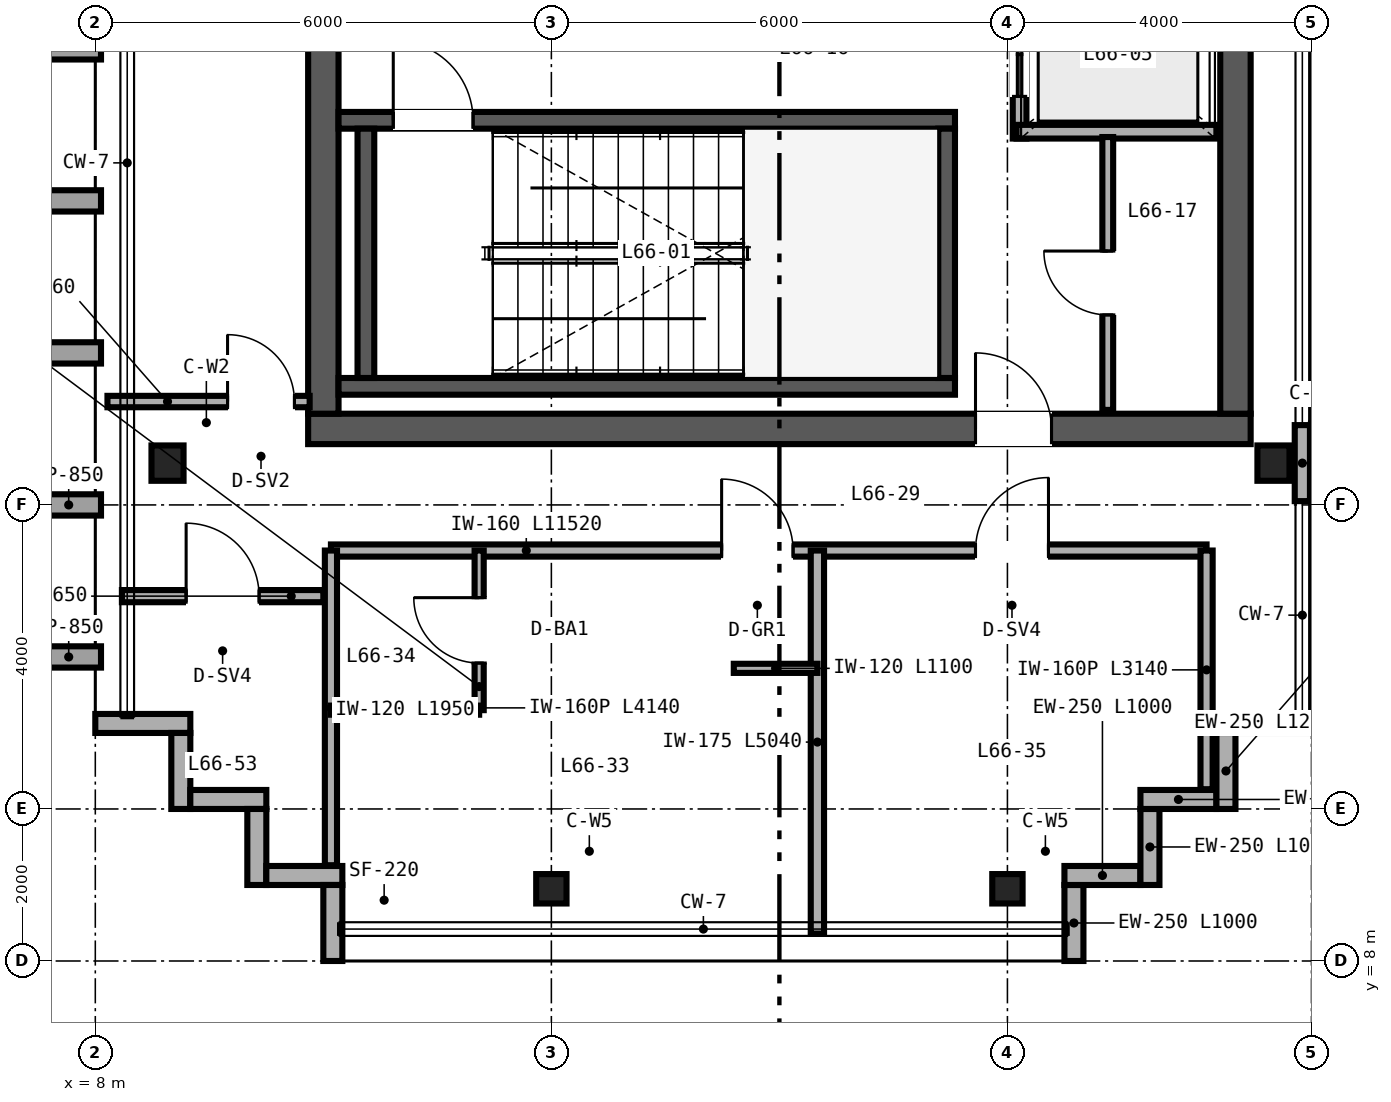
"""IFC4 building model, lengths in metres.
Left out: names, types, materials, properties, quantities, classifications, styles, units other than length and angle.
Written with IfcOpenShell. Run it as: python <this file> out.ifc"""

import sys

from ifc_helpers import new_model, si_unit, direction, frame, frame_2d, origin, origin_2d, place, context, subcontext, project, spatial, rectangle, i_section, extrude, source, transform, mapped, element, fill, save


model = new_model("IFC4")
c1 = context("Model", 3, precision=1e-05, world=origin(), true_north=direction((0.0, 1.0)))
c2 = subcontext(c1, "Body", "Model", "MODEL_VIEW")
j1 = project(units=[si_unit("LENGTHUNIT", "METRE"), si_unit("PLANEANGLEUNIT", "RADIAN")], contexts=[c1])
p1 = place(None, origin())
s1 = spatial("IfcSite", under=j1, at=p1, CompositionType="ELEMENT")
p2 = place(p1, origin())
s2 = spatial("IfcBuilding", under=s1, at=p2, CompositionType="ELEMENT")
p3 = place(p2, frame((0.0, 0.0, 261.6)))
s3 = spatial("IfcBuildingStorey", under=s2, at=p3, CompositionType="ELEMENT", Elevation=261.6)
p4 = place(p3, frame((10.8, 15.0, 0.0), z_axis=(0.0, 0.0, 1.0), x_axis=(1.0, 0.0, 0.0)))
e1 = element("IfcWall", 1, at=p4, inside=s3, PredefinedType="SHEAR", context=c2, shape_type="SweptSolid", body=[
    extrude(rectangle(XDim=12.4, YDim=0.4, at=frame_2d((6.2, 0.0))), origin(), (0.0, 0.0, 1.0), 3.38),
])
p5 = place(p4, frame((8.78, 0.0, 0.0)))
e2 = element("IfcOpeningElement", 2, at=p5, cuts=e1, PredefinedType="OPENING", context=c2, shape_type="SweptSolid", body=[
    extrude(rectangle(XDim=1.0, YDim=2.15, at=frame_2d((0.5, 1.075))), frame((0.0, 0.21, 0.0), z_axis=(0.0, -1.0, 0.0), x_axis=(1.0, 0.0, 0.0)), (0.0, 0.0, 1.0), 0.42),
])
for number, where, z_axis, x_axis in (
    (3, (11.0, 15.2, 0.0), (0.0, 0.0, 1.0), (0.0, 1.0, 0.0)),
    (4, (23.0, 15.2, 0.0), (0.0, 0.0, 1.0), (0.0, 1.0, 0.0)),
):
    element("IfcWall", number, at=place(p3, frame(where, z_axis=z_axis, x_axis=x_axis)), inside=s3, PredefinedType="SHEAR", context=c2, shape_type="SweptSolid", body=[
        extrude(rectangle(XDim=21.6, YDim=0.4, at=frame_2d((10.8, 0.0))), origin(), (0.0, 0.0, 1.0), 3.38),
    ])
p6 = place(p3, frame((11.2, 15.56, 0.0), z_axis=(0.0, 0.0, 1.0), x_axis=(1.0, 0.0, 0.0)))
e5 = element("IfcWall", 5, at=p6, inside=s3, PredefinedType="SHEAR", context=c2, shape_type="SweptSolid", body=[
    extrude(rectangle(XDim=8.11, YDim=0.22, at=frame_2d((4.055, 0.0))), origin(), (0.0, 0.0, 1.0), 3.4),
])
p7 = place(p3, frame((11.2, 19.06, 0.0), z_axis=(0.0, 0.0, 1.0), x_axis=(1.0, 0.0, 0.0)))
e6 = element("IfcWall", 6, at=p7, inside=s3, PredefinedType="SHEAR", context=c2, shape_type="SweptSolid", body=[
    extrude(rectangle(XDim=8.11, YDim=0.22, at=frame_2d((4.055, 0.0))), origin(), (0.0, 0.0, 1.0), 3.4),
])
p8 = place(p7, frame((0.72, 0.0, 0.0)))
e7 = element("IfcOpeningElement", 7, at=p8, cuts=e6, PredefinedType="OPENING", context=c2, shape_type="SweptSolid", body=[
    extrude(rectangle(XDim=1.05, YDim=2.15, at=frame_2d((0.525, 1.075))), frame((0.0, 0.12, 0.0), z_axis=(0.0, -1.0, 0.0), x_axis=(1.0, 0.0, 0.0)), (0.0, 0.0, 1.0), 0.24),
])
for number, where, z_axis, x_axis in (
    (8, (11.56, 15.67, 0.0), (0.0, 0.0, 1.0), (0.0, 1.0, 0.0)),
    (9, (19.2, 15.67, 0.0), (0.0, 0.0, 1.0), (0.0, 1.0, 0.0)),
):
    element("IfcWall", number, at=place(p3, frame(where, z_axis=z_axis, x_axis=x_axis)), inside=s3, PredefinedType="SHEAR", context=c2, shape_type="SweptSolid", body=[
        extrude(rectangle(XDim=3.28, YDim=0.22, at=frame_2d((1.64, 0.0))), origin(), (0.0, 0.0, 1.0), 3.4),
    ])
m1 = source(origin(), c2, "Body", "SweptSolid", [
    extrude(i_section(OverallWidth=0.422, OverallDepth=0.465, WebThickness=0.045, FlangeThickness=0.073, FilletRadius=0.025, at=origin_2d()), origin(), (0.0, 0.0, 1.0), 3.38),
])
for number, where, z_axis, x_axis in (
    (10, (8.95, 14.55, 0.0), (0.0, 0.0, 1.0), (1.0, 0.0, 0.0)),
    (11, (23.5, 14.55, 0.0), (0.0, 0.0, 1.0), (1.0, 0.0, 0.0)),
):
    element("IfcColumn", number, at=place(p3, frame(where, z_axis=z_axis, x_axis=x_axis)), inside=s3, PredefinedType="COLUMN", context=c2, shape_type="MappedRepresentation", body=[
        mapped(m1, transform((0.0, 0.0, 0.0), scale=1.0)),
    ])
m2 = source(origin(), c2, "Body", "SweptSolid", [
    extrude(i_section(OverallWidth=0.399, OverallDepth=0.387, WebThickness=0.021, FlangeThickness=0.033, FilletRadius=0.025, at=origin_2d()), origin(), (0.0, 0.0, 1.0), 3.38),
])
for number, where, z_axis, x_axis in (
    (12, (14.0, 8.95, 0.0), (0.0, 0.0, 1.0), (1.0, 0.0, 0.0)),
    (13, (20.0, 8.95, 0.0), (0.0, 0.0, 1.0), (1.0, 0.0, 0.0)),
):
    element("IfcColumn", number, at=place(p3, frame(where, z_axis=z_axis, x_axis=x_axis)), inside=s3, PredefinedType="COLUMN", context=c2, shape_type="MappedRepresentation", body=[
        mapped(m2, transform((0.0, 0.0, 0.0), scale=1.0)),
    ])
for number, where, z_axis, x_axis in (
    (14, (20.875, 8.0, 0.0), (0.0, 0.0, 1.0), (0.0, 1.0, 0.0)),
    (15, (20.75, 9.125, 0.0), (0.0, 0.0, 1.0), (1.0, 0.0, 0.0)),
    (16, (21.875, 9.0, 0.0), (0.0, 0.0, 1.0), (0.0, 1.0, 0.0)),
    (17, (21.75, 10.125, 0.0), (0.0, 0.0, 1.0), (1.0, 0.0, 0.0)),
    (18, (22.875, 10.0, 0.0), (0.0, 0.0, 1.0), (0.0, 1.0, 0.0)),
):
    element("IfcWall", number, at=place(p3, frame(where, z_axis=z_axis, x_axis=x_axis)), inside=s3, PredefinedType="SOLIDWALL", context=c2, shape_type="SweptSolid", body=[
        extrude(rectangle(XDim=1.0, YDim=0.25, at=frame_2d((0.5, 0.0))), origin(), (0.0, 0.0, 1.0), 3.38),
    ])
for number, where, z_axis, x_axis in (
    (19, (22.75, 11.125, 0.0), (0.0, 0.0, 1.0), (1.0, 0.0, 0.0)),
    (20, (8.0, 11.125, 0.0), (0.0, 0.0, 1.0), (1.0, 0.0, 0.0)),
):
    element("IfcWall", number, at=place(p3, frame(where, z_axis=z_axis, x_axis=x_axis)), inside=s3, PredefinedType="SOLIDWALL", context=c2, shape_type="SweptSolid", body=[
        extrude(rectangle(XDim=1.25, YDim=0.25, at=frame_2d((0.625, 0.0))), origin(), (0.0, 0.0, 1.0), 3.38),
    ])
for number, where, z_axis, x_axis in (
    (21, (9.125, 11.0, 0.0), (0.0, 0.0, 1.0), (0.0, -1.0, 0.0)),
    (22, (9.25, 10.125, 0.0), (0.0, 0.0, 1.0), (1.0, 0.0, 0.0)),
    (23, (10.125, 10.0, 0.0), (0.0, 0.0, 1.0), (0.0, -1.0, 0.0)),
    (24, (10.25, 9.125, 0.0), (0.0, 0.0, 1.0), (1.0, 0.0, 0.0)),
    (25, (11.125, 9.0, 0.0), (0.0, 0.0, 1.0), (0.0, -1.0, 0.0)),
):
    element("IfcWall", number, at=place(p3, frame(where, z_axis=z_axis, x_axis=x_axis)), inside=s3, PredefinedType="SOLIDWALL", context=c2, shape_type="SweptSolid", body=[
        extrude(rectangle(XDim=1.0, YDim=0.25, at=frame_2d((0.5, 0.0))), origin(), (0.0, 0.0, 1.0), 3.38),
    ])
p9 = place(p3, frame((23.88, 14.05, 0.0), z_axis=(0.0, 0.0, 1.0), x_axis=(0.0, 1.0, 0.0)))
e26 = element("IfcWall", 26, at=p9, inside=s3, PredefinedType="PARAPET", context=c2, shape_type="SweptSolid", body=[
    extrude(rectangle(XDim=1.0, YDim=0.2, at=frame_2d((0.5, 0.0))), origin(), (0.0, 0.0, 1.0), 3.38),
])
p10 = place(p3, frame((20.16, 18.82, 0.0), z_axis=(0.0, 0.0, 1.0), x_axis=(0.0, 1.0, 0.0)))
e27 = element("IfcWall", 27, at=p10, inside=s3, PredefinedType="SOLIDWALL", context=c2, shape_type="SweptSolid", body=[
    extrude(rectangle(XDim=6.32, YDim=0.18, at=frame_2d((3.16, 0.0))), origin(), (0.0, 0.0, 1.0), 2.48),
])
p11 = place(p10, frame((0.555, 0.0, 0.0)))
e28 = element("IfcOpeningElement", 28, at=p11, cuts=e27, PredefinedType="OPENING", context=c2, shape_type="SweptSolid", body=[
    extrude(rectangle(XDim=1.1, YDim=2.2, at=frame_2d((0.55, 1.1))), frame((0.0, 0.1, 0.0), z_axis=(0.0, -1.0, 0.0), x_axis=(1.0, 0.0, 0.0)), (0.0, 0.0, 1.0), 0.2),
])
p12 = place(p10, frame((2.635, 0.0, 0.0)))
e29 = element("IfcOpeningElement", 29, at=p12, cuts=e27, PredefinedType="OPENING", context=c2, shape_type="SweptSolid", body=[
    extrude(rectangle(XDim=1.1, YDim=2.2, at=frame_2d((0.55, 1.1))), frame((0.0, 0.1, 0.0), z_axis=(0.0, -1.0, 0.0), x_axis=(1.0, 0.0, 0.0)), (0.0, 0.0, 1.0), 0.2),
])
p13 = place(p10, frame((4.69, 0.0, 0.0)))
e30 = element("IfcOpeningElement", 30, at=p13, cuts=e27, PredefinedType="OPENING", context=c2, shape_type="SweptSolid", body=[
    extrude(rectangle(XDim=1.1, YDim=2.2, at=frame_2d((0.55, 1.1))), frame((0.0, 0.1, 0.0), z_axis=(0.0, -1.0, 0.0), x_axis=(1.0, 0.0, 0.0)), (0.0, 0.0, 1.0), 0.2),
])
p14 = place(p3, frame((20.12, 18.91, 0.0), z_axis=(0.0, 0.0, 1.0), x_axis=(1.0, 0.0, 0.0)))
e31 = element("IfcWall", 31, at=p14, inside=s3, PredefinedType="SOLIDWALL", context=c2, shape_type="SweptSolid", body=[
    extrude(rectangle(XDim=2.63, YDim=0.18, at=frame_2d((1.315, 0.0))), origin(), (0.0, 0.0, 1.0), 3.38),
])
p15 = place(p3, frame((21.32, 15.25, 0.0), z_axis=(0.0, 0.0, 1.0), x_axis=(0.0, 1.0, 0.0)))
e32 = element("IfcWall", 32, at=p15, inside=s3, PredefinedType="PARTITIONING", context=c2, shape_type="SweptSolid", body=[
    extrude(rectangle(XDim=3.59, YDim=0.142, at=frame_2d((1.795, 0.0))), origin(), (0.0, 0.0, 1.0), 3.38),
])
p16 = place(p15, frame((1.25, 0.0, 0.0)))
e33 = element("IfcOpeningElement", 33, at=p16, cuts=e32, PredefinedType="OPENING", context=c2, shape_type="SweptSolid", body=[
    extrude(rectangle(XDim=0.84, YDim=2.1, at=frame_2d((0.42, 1.05))), frame((0.0, 0.081, 0.0), z_axis=(0.0, -1.0, 0.0), x_axis=(1.0, 0.0, 0.0)), (0.0, 0.0, 1.0), 0.162),
])
p17 = place(p3, frame((11.1, 13.4, 0.0), z_axis=(0.0, 0.0, 1.0), x_axis=(1.0, 0.0, 0.0)))
e34 = element("IfcWall", 34, at=p17, inside=s3, PredefinedType="PARTITIONING", context=c2, shape_type="SweptSolid", body=[
    extrude(rectangle(XDim=11.52, YDim=0.16, at=frame_2d((5.76, 0.0))), origin(), (0.0, 0.0, 1.0), 3.38),
])
p18 = place(p17, frame((5.14, 0.0, 0.0)))
e35 = element("IfcOpeningElement", 35, at=p18, cuts=e34, PredefinedType="OPENING", context=c2, shape_type="SweptSolid", body=[
    extrude(rectangle(XDim=0.94, YDim=2.15, at=frame_2d((0.47, 1.075))), frame((0.0, 0.09, 0.0), z_axis=(0.0, -1.0, 0.0), x_axis=(1.0, 0.0, 0.0)), (0.0, 0.0, 1.0), 0.18),
])
p19 = place(p17, frame((8.48, 0.0, 0.0)))
e36 = element("IfcOpeningElement", 36, at=p19, cuts=e34, PredefinedType="OPENING", context=c2, shape_type="SweptSolid", body=[
    extrude(rectangle(XDim=0.96, YDim=2.15, at=frame_2d((0.48, 1.075))), frame((0.0, 0.09, 0.0), z_axis=(0.0, -1.0, 0.0), x_axis=(1.0, 0.0, 0.0)), (0.0, 0.0, 1.0), 0.18),
])
p20 = place(p3, frame((11.1, 9.26, 0.0), z_axis=(0.0, 0.0, 1.0), x_axis=(0.0, 1.0, 0.0)))
e37 = element("IfcWall", 37, at=p20, inside=s3, PredefinedType="PARTITIONING", context=c2, shape_type="SweptSolid", body=[
    extrude(rectangle(XDim=4.14, YDim=0.16, at=frame_2d((2.07, 0.0))), origin(), (0.0, 0.0, 1.0), 3.38),
])
p21 = place(p3, frame((22.62, 10.26, 0.0), z_axis=(0.0, 0.0, 1.0), x_axis=(0.0, 1.0, 0.0)))
e38 = element("IfcWall", 38, at=p21, inside=s3, PredefinedType="PARTITIONING", context=c2, shape_type="SweptSolid", body=[
    extrude(rectangle(XDim=3.14, YDim=0.16, at=frame_2d((1.57, 0.0))), origin(), (0.0, 0.0, 1.0), 3.38),
])
p22 = place(p3, frame((17.5, 8.36, 0.0), z_axis=(0.0, 0.0, 1.0), x_axis=(0.0, 1.0, 0.0)))
e39 = element("IfcWall", 39, at=p22, inside=s3, PredefinedType="PARTITIONING", context=c2, shape_type="SweptSolid", body=[
    extrude(rectangle(XDim=5.04, YDim=0.175, at=frame_2d((2.52, 0.0))), origin(), (0.0, 0.0, 1.0), 2.687),
])
p23 = place(p3, frame((13.05, 11.3, 0.0), z_axis=(0.0, 0.0, 1.0), x_axis=(0.0, 1.0, 0.0)))
e40 = element("IfcWall", 40, at=p23, inside=s3, PredefinedType="PARTITIONING", context=c2, shape_type="SweptSolid", body=[
    extrude(rectangle(XDim=2.1, YDim=0.12, at=frame_2d((1.05, 0.0))), origin(), (0.0, 0.0, 1.0), 3.38),
])
p24 = place(p23, frame((0.62, 0.0, 0.0)))
e41 = element("IfcOpeningElement", 41, at=p24, cuts=e40, PredefinedType="OPENING", context=c2, shape_type="SweptSolid", body=[
    extrude(rectangle(XDim=0.86, YDim=2.1, at=frame_2d((0.43, 1.05))), frame((0.0, 0.07, 0.0), z_axis=(0.0, -1.0, 0.0), x_axis=(1.0, 0.0, 0.0)), (0.0, 0.0, 1.0), 0.14),
])
p25 = place(p3, frame((11.1, 11.3, 0.0), z_axis=(0.0, 0.0, 1.0), x_axis=(1.0, 0.0, 0.0)))
e42 = element("IfcWall", 42, at=p25, inside=s3, PredefinedType="PARTITIONING", context=c2, shape_type="SweptSolid", body=[
    extrude(rectangle(XDim=1.95, YDim=0.12, at=frame_2d((0.975, 0.0))), origin(), (0.0, 0.0, 1.0), 3.38),
])
p26 = place(p3, frame((16.4, 11.85, 0.0), z_axis=(0.0, 0.0, 1.0), x_axis=(1.0, 0.0, 0.0)))
e43 = element("IfcWall", 43, at=p26, inside=s3, PredefinedType="PARTITIONING", context=c2, shape_type="SweptSolid", body=[
    extrude(rectangle(XDim=1.1, YDim=0.12, at=frame_2d((0.55, 0.0))), origin(), (0.0, 0.0, 1.0), 3.38),
])
p27 = place(p3, frame((8.16, 15.36, 0.0), z_axis=(0.0, 0.0, 1.0), x_axis=(1.0, 0.0, 0.0)))
e44 = element("IfcWall", 44, at=p27, inside=s3, PredefinedType="PARTITIONING", context=c2, shape_type="SweptSolid", body=[
    extrude(rectangle(XDim=2.66, YDim=0.15, at=frame_2d((1.33, 0.0))), origin(), (0.0, 0.0, 1.0), 2.601),
])
p28 = place(p27, frame((1.58, 0.0, 0.0)))
e45 = element("IfcOpeningElement", 45, at=p28, cuts=e44, PredefinedType="OPENING", context=c2, shape_type="SweptSolid", body=[
    extrude(rectangle(XDim=0.88, YDim=2.15, at=frame_2d((0.44, 1.075))), frame((0.0, 0.085, 0.0), z_axis=(0.0, -1.0, 0.0), x_axis=(1.0, 0.0, 0.0)), (0.0, 0.0, 1.0), 0.17),
])
p29 = place(p3, frame((8.35, 12.8, 0.0), z_axis=(0.0, 0.0, 1.0), x_axis=(1.0, 0.0, 0.0)))
e46 = element("IfcWall", 46, at=p29, inside=s3, PredefinedType="PARTITIONING", context=c2, shape_type="SweptSolid", body=[
    extrude(rectangle(XDim=2.65, YDim=0.16, at=frame_2d((1.325, 0.0))), origin(), (0.0, 0.0, 1.0), 3.38),
])
p30 = place(p29, frame((0.845, 0.0, 0.0)))
e47 = element("IfcOpeningElement", 47, at=p30, cuts=e46, PredefinedType="OPENING", context=c2, shape_type="SweptSolid", body=[
    extrude(rectangle(XDim=0.96, YDim=2.15, at=frame_2d((0.48, 1.075))), frame((0.0, 0.09, 0.0), z_axis=(0.0, -1.0, 0.0), x_axis=(1.0, 0.0, 0.0)), (0.0, 0.0, 1.0), 0.18),
])
m3 = source(origin(), c2, "Body", "SweptSolid", [
    extrude(rectangle(XDim=1.05, YDim=2.15, at=frame_2d((0.525, 1.075))), frame((0.0, 0.025, 0.0), z_axis=(0.0, -1.0, 0.0), x_axis=(1.0, 0.0, 0.0)), (0.0, 0.0, 1.0), 0.05),
])
p31 = place(p8, origin())
e48 = element("IfcDoor", 48, at=p31, inside=s3, OperationType="SINGLE_SWING_LEFT", PredefinedType="DOOR", context=c2, shape_type="MappedRepresentation", body=[
    mapped(m3, transform((0.0, 0.0, 0.0), scale=1.0)),
])
fill(e7, e48)
m4 = source(origin(), c2, "Body", "SweptSolid", [
    extrude(rectangle(XDim=1.1, YDim=2.2, at=frame_2d((0.55, 1.1))), frame((0.0, 0.025, 0.0), z_axis=(0.0, -1.0, 0.0), x_axis=(1.0, 0.0, 0.0)), (0.0, 0.0, 1.0), 0.05),
])
p32 = place(p11, origin())
e49 = element("IfcDoor", 49, at=p32, inside=s3, OperationType="DOUBLE_DOOR_SLIDING", PredefinedType="DOOR", context=c2, shape_type="MappedRepresentation", body=[
    mapped(m4, transform((0.0, 0.0, 0.0), scale=1.0)),
])
fill(e28, e49)
m5 = source(origin(), c2, "Body", "SweptSolid", [
    extrude(rectangle(XDim=0.84, YDim=2.1, at=frame_2d((0.42, 1.05))), frame((0.0, 0.025, 0.0), z_axis=(0.0, -1.0, 0.0), x_axis=(1.0, 0.0, 0.0)), (0.0, 0.0, 1.0), 0.05),
])
p33 = place(p16, origin())
e50 = element("IfcDoor", 50, at=p33, inside=s3, OperationType="SINGLE_SWING_RIGHT", PredefinedType="DOOR", context=c2, shape_type="MappedRepresentation", body=[
    mapped(m5, transform((0.0, 0.0, 0.0), scale=1.0)),
])
fill(e33, e50)
m6 = source(origin(), c2, "Body", "SweptSolid", [
    extrude(rectangle(XDim=1.0, YDim=2.15, at=frame_2d((0.5, 1.075))), frame((0.0, 0.025, 0.0), z_axis=(0.0, -1.0, 0.0), x_axis=(1.0, 0.0, 0.0)), (0.0, 0.0, 1.0), 0.05),
])
p34 = place(p5, origin())
e51 = element("IfcDoor", 51, at=p34, inside=s3, OperationType="SINGLE_SWING_LEFT", PredefinedType="DOOR", context=c2, shape_type="MappedRepresentation", body=[
    mapped(m6, transform((0.0, 0.0, 0.0), scale=1.0)),
])
fill(e2, e51)
m7 = source(origin(), c2, "Body", "SweptSolid", [
    extrude(rectangle(XDim=0.86, YDim=2.1, at=frame_2d((0.43, 1.05))), frame((0.0, 0.025, 0.0), z_axis=(0.0, -1.0, 0.0), x_axis=(1.0, 0.0, 0.0)), (0.0, 0.0, 1.0), 0.05),
])
p35 = place(p24, origin())
e52 = element("IfcDoor", 52, at=p35, inside=s3, OperationType="SINGLE_SWING_RIGHT", PredefinedType="DOOR", context=c2, shape_type="MappedRepresentation", body=[
    mapped(m7, transform((0.0, 0.0, 0.0), scale=1.0)),
])
fill(e41, e52)
m8 = source(origin(), c2, "Body", "SweptSolid", [
    extrude(rectangle(XDim=0.94, YDim=2.15, at=frame_2d((0.47, 1.075))), frame((0.0, 0.025, 0.0), z_axis=(0.0, -1.0, 0.0), x_axis=(1.0, 0.0, 0.0)), (0.0, 0.0, 1.0), 0.05),
])
p36 = place(p18, origin())
e53 = element("IfcDoor", 53, at=p36, inside=s3, OperationType="SINGLE_SWING_LEFT", PredefinedType="DOOR", context=c2, shape_type="MappedRepresentation", body=[
    mapped(m8, transform((0.0, 0.0, 0.0), scale=1.0)),
])
fill(e35, e53)
m9 = source(origin(), c2, "Body", "SweptSolid", [
    extrude(rectangle(XDim=0.96, YDim=2.15, at=frame_2d((0.48, 1.075))), frame((0.0, 0.025, 0.0), z_axis=(0.0, -1.0, 0.0), x_axis=(1.0, 0.0, 0.0)), (0.0, 0.0, 1.0), 0.05),
])
p37 = place(p19, origin())
e54 = element("IfcDoor", 54, at=p37, inside=s3, OperationType="SINGLE_SWING_RIGHT", PredefinedType="DOOR", context=c2, shape_type="MappedRepresentation", body=[
    mapped(m9, transform((0.0, 0.0, 0.0), scale=1.0)),
])
fill(e36, e54)
m10 = source(origin(), c2, "Body", "SweptSolid", [
    extrude(rectangle(XDim=0.88, YDim=2.15, at=frame_2d((0.44, 1.075))), frame((0.0, 0.025, 0.0), z_axis=(0.0, -1.0, 0.0), x_axis=(1.0, 0.0, 0.0)), (0.0, 0.0, 1.0), 0.05),
])
p38 = place(p28, origin())
e55 = element("IfcDoor", 55, at=p38, inside=s3, OperationType="SINGLE_SWING_LEFT", PredefinedType="DOOR", context=c2, shape_type="MappedRepresentation", body=[
    mapped(m10, transform((0.0, 0.0, 0.0), scale=1.0)),
])
fill(e45, e55)
p39 = place(p30, origin())
e56 = element("IfcDoor", 56, at=p39, inside=s3, OperationType="SINGLE_SWING_LEFT", PredefinedType="DOOR", context=c2, shape_type="MappedRepresentation", body=[
    mapped(m9, transform((0.0, 0.0, 0.0), scale=1.0)),
])
fill(e47, e56)
save(model, sys.argv[1])
